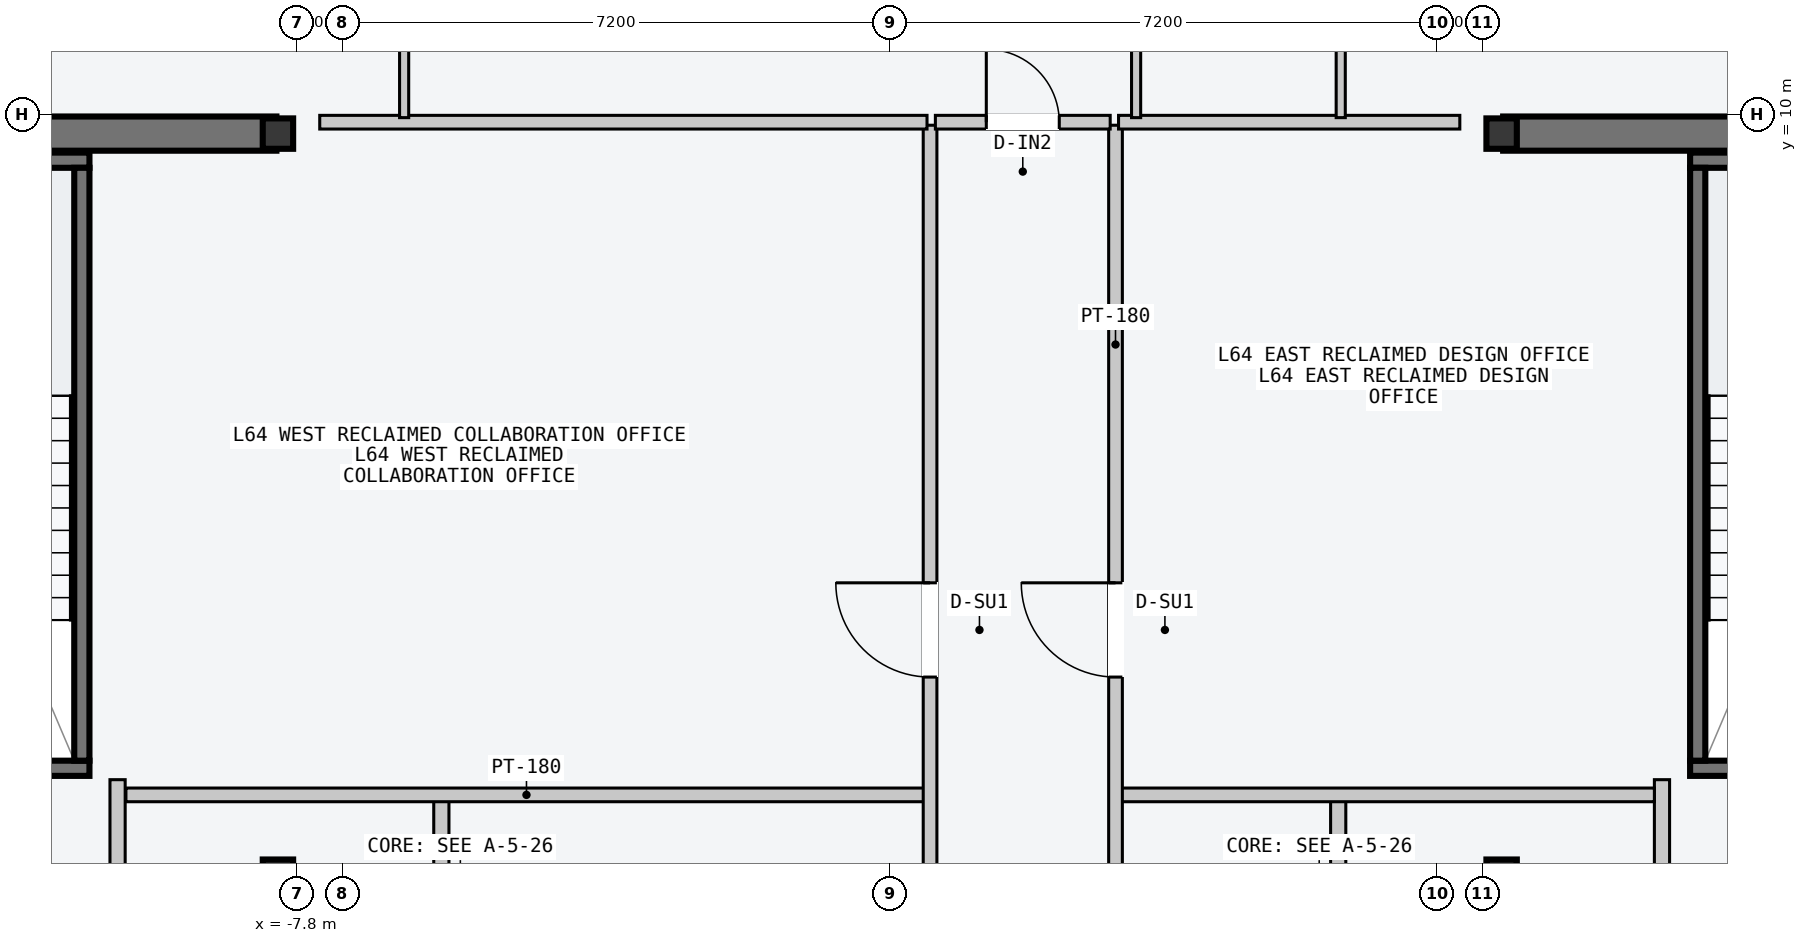
"""IFC4 building model, lengths in metres.
Left out: names, types, materials, properties, quantities, classifications, styles, units other than length and angle.
Written with IfcOpenShell. Run it as: python <this file> out.ifc"""

import sys

from ifc_helpers import new_model, si_unit, direction, frame, frame_2d, origin, origin_2d, place, context, subcontext, project, spatial, rectangle, i_section, extrude, element, fill, save


model = new_model("IFC4")
c1 = context("Model", 3, precision=1e-05, world=origin(), true_north=direction((0.0, 1.0)))
c2 = subcontext(c1, "Body", "Model", "MODEL_VIEW")
j1 = project(units=[si_unit("LENGTHUNIT", "METRE"), si_unit("PLANEANGLEUNIT", "RADIAN")], contexts=[c1])
p1 = place(None, origin())
s1 = spatial("IfcSite", under=j1, at=p1, CompositionType="ELEMENT")
p2 = place(p1, origin())
s2 = spatial("IfcBuilding", under=s1, at=p2, CompositionType="ELEMENT")
p3 = place(p2, frame((0.0, 0.0, 243.6)))
s3 = spatial("IfcBuildingStorey", under=s2, at=p3, CompositionType="ELEMENT", Elevation=243.6)
for number, where, z_axis, x_axis in (
    (1, (-14.53, 9.75, -0.2), (0.0, 0.0, 1.0), (1.0, 0.0, 0.0)),
    (2, (8.07, 9.75, -0.2), (0.0, 0.0, 1.0), (1.0, 0.0, 0.0)),
):
    element("IfcWall", number, at=place(p3, frame(where, z_axis=z_axis, x_axis=x_axis)), inside=s3, PredefinedType="SHEAR", context=c2, shape_type="SweptSolid", body=[
        extrude(rectangle(XDim=6.46, YDim=0.45, at=frame_2d((3.23, 0.0))), origin(), (0.0, 0.0, 1.0), 3.6),
    ])
p4 = place(p3, frame((-14.25, 1.4, -0.2), z_axis=(0.0, 0.0, 1.0), x_axis=(1.0, 0.0, 0.0)))
e3 = element("IfcWall", 3, at=p4, inside=s3, PredefinedType="SOLIDWALL", context=c2, shape_type="SweptSolid", body=[
    extrude(rectangle(XDim=3.72, YDim=0.2, at=frame_2d((1.86, 0.0))), origin(), (0.0, 0.0, 1.0), 3.6),
])
p5 = place(p4, frame((1.5, 0.0, 0.2)))
e4 = element("IfcOpeningElement", 4, at=p5, cuts=e3, PredefinedType="OPENING", context=c2, shape_type="SweptSolid", body=[
    extrude(rectangle(XDim=1.12, YDim=2.18, at=frame_2d((0.56, 1.09))), frame((0.0, 0.11, 0.0), z_axis=(0.0, -1.0, 0.0), x_axis=(1.0, 0.0, 0.0)), (0.0, 0.0, 1.0), 0.22),
])
p6 = place(p3, frame((-14.25, 9.4, -0.2), z_axis=(0.0, 0.0, 1.0), x_axis=(1.0, 0.0, 0.0)))
e5 = element("IfcWall", 5, at=p6, inside=s3, PredefinedType="SOLIDWALL", context=c2, shape_type="SweptSolid", body=[
    extrude(rectangle(XDim=3.72, YDim=0.2, at=frame_2d((1.86, 0.0))), origin(), (0.0, 0.0, 1.0), 3.6),
])
p7 = place(p3, frame((-10.63, 1.5, -0.2), z_axis=(0.0, 0.0, 1.0), x_axis=(0.0, 1.0, 0.0)))
e6 = element("IfcWall", 6, at=p7, inside=s3, PredefinedType="SOLIDWALL", context=c2, shape_type="SweptSolid", body=[
    extrude(rectangle(XDim=7.8, YDim=0.2, at=frame_2d((3.9, 0.0))), origin(), (0.0, 0.0, 1.0), 3.6),
])
p8 = place(p3, frame((10.53, 1.4, -0.2), z_axis=(0.0, 0.0, 1.0), x_axis=(1.0, 0.0, 0.0)))
e7 = element("IfcWall", 7, at=p8, inside=s3, PredefinedType="SOLIDWALL", context=c2, shape_type="SweptSolid", body=[
    extrude(rectangle(XDim=3.72, YDim=0.2, at=frame_2d((1.86, 0.0))), origin(), (0.0, 0.0, 1.0), 3.6),
])
p9 = place(p8, frame((1.5, 0.0, 0.2)))
e8 = element("IfcOpeningElement", 8, at=p9, cuts=e7, PredefinedType="OPENING", context=c2, shape_type="SweptSolid", body=[
    extrude(rectangle(XDim=1.12, YDim=2.18, at=frame_2d((0.56, 1.09))), frame((0.0, 0.11, 0.0), z_axis=(0.0, -1.0, 0.0), x_axis=(1.0, 0.0, 0.0)), (0.0, 0.0, 1.0), 0.22),
])
p10 = place(p3, frame((10.53, 9.4, -0.2), z_axis=(0.0, 0.0, 1.0), x_axis=(1.0, 0.0, 0.0)))
e9 = element("IfcWall", 9, at=p10, inside=s3, PredefinedType="SOLIDWALL", context=c2, shape_type="SweptSolid", body=[
    extrude(rectangle(XDim=3.72, YDim=0.2, at=frame_2d((1.86, 0.0))), origin(), (0.0, 0.0, 1.0), 3.6),
])
p11 = place(p3, frame((10.63, 1.5, -0.2), z_axis=(0.0, 0.0, 1.0), x_axis=(0.0, 1.0, 0.0)))
e10 = element("IfcWall", 10, at=p11, inside=s3, PredefinedType="SOLIDWALL", context=c2, shape_type="SweptSolid", body=[
    extrude(rectangle(XDim=7.8, YDim=0.2, at=frame_2d((3.9, 0.0))), origin(), (0.0, 0.0, 1.0), 3.6),
])
for number, where, z_axis, x_axis in (
    (11, (-8.05, 0.0, 0.0), (0.0, 0.0, 1.0), (1.0, 0.0, 0.0)),
    (12, (-8.05, 9.75, 0.0), (0.0, 0.0, 1.0), (1.0, 0.0, 0.0)),
    (13, (8.05, 0.0, 0.0), (0.0, 0.0, 1.0), (1.0, 0.0, 0.0)),
    (14, (8.05, 9.75, 0.0), (0.0, 0.0, 1.0), (1.0, 0.0, 0.0)),
):
    element("IfcColumn", number, at=place(p3, frame(where, z_axis=z_axis, x_axis=x_axis)), inside=s3, PredefinedType="COLUMN", context=c2, shape_type="SweptSolid", body=[
        extrude(i_section(OverallWidth=0.4, OverallDepth=0.4, WebThickness=0.013, FlangeThickness=0.021, at=origin_2d()), origin(), (0.0, 0.0, 1.0), 3.6),
    ])
p12 = place(p3, frame((-5.9, -9.45, 0.0), z_axis=(0.0, 0.0, 1.0), x_axis=(0.0, 1.0, 0.0)))
e15 = element("IfcWall", 15, at=p12, inside=s3, PredefinedType="PARTITIONING", context=c2, shape_type="SweptSolid", body=[
    extrude(rectangle(XDim=10.5, YDim=0.2, at=frame_2d((5.25, 0.0))), origin(), (0.0, 0.0, 1.0), 3.4),
])
p13 = place(p12, frame((3.9, 0.0, 0.0)))
e16 = element("IfcOpeningElement", 16, at=p13, cuts=e15, PredefinedType="OPENING", context=c2, shape_type="SweptSolid", body=[
    extrude(rectangle(XDim=1.5, YDim=2.2, at=frame_2d((0.75, 1.1))), frame((0.0, 0.11, 0.0), z_axis=(0.0, -1.0, 0.0), x_axis=(1.0, 0.0, 0.0)), (0.0, 0.0, 1.0), 0.22),
])
p14 = place(p3, frame((-10.16, -2.55, 0.0), z_axis=(0.0, 0.0, 1.0), x_axis=(0.0, 1.0, 0.0)))
e17 = element("IfcWall", 17, at=p14, inside=s3, PredefinedType="PARTITIONING", context=c2, shape_type="SweptSolid", body=[
    extrude(rectangle(XDim=3.8, YDim=0.2, at=frame_2d((1.9, 0.0))), origin(), (0.0, 0.0, 1.0), 3.4),
])
p15 = place(p14, frame((1.3, 0.0, 0.0)))
e18 = element("IfcOpeningElement", 18, at=p15, cuts=e17, PredefinedType="OPENING", context=c2, shape_type="SweptSolid", body=[
    extrude(rectangle(XDim=1.1, YDim=2.15, at=frame_2d((0.55, 1.075))), frame((0.0, 0.11, 0.0), z_axis=(0.0, -1.0, 0.0), x_axis=(1.0, 0.0, 0.0)), (0.0, 0.0, 1.0), 0.22),
])
p16 = place(p3, frame((5.9, -9.45, 0.0), z_axis=(0.0, 0.0, 1.0), x_axis=(0.0, 1.0, 0.0)))
e19 = element("IfcWall", 19, at=p16, inside=s3, PredefinedType="PARTITIONING", context=c2, shape_type="SweptSolid", body=[
    extrude(rectangle(XDim=10.5, YDim=0.2, at=frame_2d((5.25, 0.0))), origin(), (0.0, 0.0, 1.0), 3.4),
])
p17 = place(p16, frame((3.9, 0.0, 0.0)))
e20 = element("IfcOpeningElement", 20, at=p17, cuts=e19, PredefinedType="OPENING", context=c2, shape_type="SweptSolid", body=[
    extrude(rectangle(XDim=1.5, YDim=2.2, at=frame_2d((0.75, 1.1))), frame((0.0, 0.11, 0.0), z_axis=(0.0, -1.0, 0.0), x_axis=(1.0, 0.0, 0.0)), (0.0, 0.0, 1.0), 0.22),
])
p18 = place(p3, frame((10.16, -2.55, 0.0), z_axis=(0.0, 0.0, 1.0), x_axis=(0.0, 1.0, 0.0)))
e21 = element("IfcWall", 21, at=p18, inside=s3, PredefinedType="PARTITIONING", context=c2, shape_type="SweptSolid", body=[
    extrude(rectangle(XDim=3.8, YDim=0.2, at=frame_2d((1.9, 0.0))), origin(), (0.0, 0.0, 1.0), 3.4),
])
p19 = place(p18, frame((1.3, 0.0, 0.0)))
e22 = element("IfcOpeningElement", 22, at=p19, cuts=e21, PredefinedType="OPENING", context=c2, shape_type="SweptSolid", body=[
    extrude(rectangle(XDim=1.1, YDim=2.15, at=frame_2d((0.55, 1.075))), frame((0.0, 0.11, 0.0), z_axis=(0.0, -1.0, 0.0), x_axis=(1.0, 0.0, 0.0)), (0.0, 0.0, 1.0), 0.22),
])
p20 = place(p3, frame((-10.05, 1.05, 0.0), z_axis=(0.0, 0.0, 1.0), x_axis=(1.0, 0.0, 0.0)))
e23 = element("IfcWall", 23, at=p20, inside=s3, PredefinedType="PARTITIONING", context=c2, shape_type="SweptSolid", body=[
    extrude(rectangle(XDim=10.54, YDim=0.18, at=frame_2d((5.27, 0.0))), origin(), (0.0, 0.0, 1.0), 3.4),
])
p21 = place(p3, frame((0.53, -3.5, 0.0), z_axis=(0.0, 0.0, 1.0), x_axis=(0.0, 1.0, 0.0)))
e24 = element("IfcWall", 24, at=p21, inside=s3, PredefinedType="PARTITIONING", context=c2, shape_type="SweptSolid", body=[
    extrude(rectangle(XDim=13.36, YDim=0.18, at=frame_2d((6.68, 0.0))), origin(), (0.0, 0.0, 1.0), 3.4),
])
p22 = place(p21, frame((6.1, 0.0, 0.0)))
e25 = element("IfcOpeningElement", 25, at=p22, cuts=e24, PredefinedType="OPENING", context=c2, shape_type="SweptSolid", body=[
    extrude(rectangle(XDim=1.24, YDim=2.24, at=frame_2d((0.62, 1.12))), frame((0.0, 0.1, 0.0), z_axis=(0.0, -1.0, 0.0), x_axis=(1.0, 0.0, 0.0)), (0.0, 0.0, 1.0), 0.2),
])
p23 = place(p21, frame((1.6, 0.0, 0.0)))
e26 = element("IfcOpeningElement", 26, at=p23, cuts=e24, PredefinedType="OPENING", context=c2, shape_type="SweptSolid", body=[
    extrude(rectangle(XDim=0.96, YDim=2.18, at=frame_2d((0.48, 1.09))), frame((0.0, 0.1, 0.0), z_axis=(0.0, -1.0, 0.0), x_axis=(1.0, 0.0, 0.0)), (0.0, 0.0, 1.0), 0.2),
])
p24 = place(p3, frame((-7.5, 9.9, 0.0), z_axis=(0.0, 0.0, 1.0), x_axis=(1.0, 0.0, 0.0)))
e27 = element("IfcWall", 27, at=p24, inside=s3, PredefinedType="PARTITIONING", context=c2, shape_type="SweptSolid", body=[
    extrude(rectangle(XDim=7.99, YDim=0.18, at=frame_2d((3.995, 0.0))), origin(), (0.0, 0.0, 1.0), 3.4),
])
p25 = place(p3, frame((3.01, 1.05, 0.0), z_axis=(0.0, 0.0, 1.0), x_axis=(1.0, 0.0, 0.0)))
e28 = element("IfcWall", 28, at=p25, inside=s3, PredefinedType="PARTITIONING", context=c2, shape_type="SweptSolid", body=[
    extrude(rectangle(XDim=7.05, YDim=0.18, at=frame_2d((3.525, 0.0))), origin(), (0.0, 0.0, 1.0), 3.4),
])
p26 = place(p3, frame((2.97, -3.5, 0.0), z_axis=(0.0, 0.0, 1.0), x_axis=(0.0, 1.0, 0.0)))
e29 = element("IfcWall", 29, at=p26, inside=s3, PredefinedType="PARTITIONING", context=c2, shape_type="SweptSolid", body=[
    extrude(rectangle(XDim=13.36, YDim=0.18, at=frame_2d((6.68, 0.0))), origin(), (0.0, 0.0, 1.0), 3.4),
])
p27 = place(p26, frame((6.1, 0.0, 0.0)))
e30 = element("IfcOpeningElement", 30, at=p27, cuts=e29, PredefinedType="OPENING", context=c2, shape_type="SweptSolid", body=[
    extrude(rectangle(XDim=1.24, YDim=2.24, at=frame_2d((0.62, 1.12))), frame((0.0, 0.1, 0.0), z_axis=(0.0, -1.0, 0.0), x_axis=(1.0, 0.0, 0.0)), (0.0, 0.0, 1.0), 0.2),
])
p28 = place(p26, frame((1.6, 0.0, 0.0)))
e31 = element("IfcOpeningElement", 31, at=p28, cuts=e29, PredefinedType="OPENING", context=c2, shape_type="SweptSolid", body=[
    extrude(rectangle(XDim=0.96, YDim=2.18, at=frame_2d((0.48, 1.09))), frame((0.0, 0.1, 0.0), z_axis=(0.0, -1.0, 0.0), x_axis=(1.0, 0.0, 0.0)), (0.0, 0.0, 1.0), 0.2),
])
p29 = place(p3, frame((3.01, 9.9, 0.0), z_axis=(0.0, 0.0, 1.0), x_axis=(1.0, 0.0, 0.0)))
e32 = element("IfcWall", 32, at=p29, inside=s3, PredefinedType="PARTITIONING", context=c2, shape_type="SweptSolid", body=[
    extrude(rectangle(XDim=4.49, YDim=0.18, at=frame_2d((2.245, 0.0))), origin(), (0.0, 0.0, 1.0), 3.4),
])
p30 = place(p3, frame((-6.39, 9.96, 0.0), z_axis=(0.0, 0.0, 1.0), x_axis=(0.0, 1.0, 0.0)))
e33 = element("IfcWall", 33, at=p30, inside=s3, PredefinedType="PARTITIONING", context=c2, shape_type="SweptSolid", body=[
    extrude(rectangle(XDim=7.6, YDim=0.12, at=frame_2d((3.8, 0.0))), origin(), (0.0, 0.0, 1.0), 3.4),
])
p31 = place(p30, frame((1.15, 0.0, 0.0)))
e34 = element("IfcOpeningElement", 34, at=p31, cuts=e33, PredefinedType="OPENING", context=c2, shape_type="SweptSolid", body=[
    extrude(rectangle(XDim=0.96, YDim=2.18, at=frame_2d((0.48, 1.09))), frame((0.0, 0.07, 0.0), z_axis=(0.0, -1.0, 0.0), x_axis=(1.0, 0.0, 0.0)), (0.0, 0.0, 1.0), 0.14),
])
p32 = place(p3, frame((3.241, 9.96, 0.0), z_axis=(0.0, 0.0, 1.0), x_axis=(0.0, 1.0, 0.0)))
e35 = element("IfcWall", 35, at=p32, inside=s3, PredefinedType="PARTITIONING", context=c2, shape_type="SweptSolid", body=[
    extrude(rectangle(XDim=7.6, YDim=0.12, at=frame_2d((3.8, 0.0))), origin(), (0.0, 0.0, 1.0), 3.4),
])
p33 = place(p32, frame((1.15, 0.0, 0.0)))
e36 = element("IfcOpeningElement", 36, at=p33, cuts=e35, PredefinedType="OPENING", context=c2, shape_type="SweptSolid", body=[
    extrude(rectangle(XDim=0.96, YDim=2.18, at=frame_2d((0.48, 1.09))), frame((0.0, 0.07, 0.0), z_axis=(0.0, -1.0, 0.0), x_axis=(1.0, 0.0, 0.0)), (0.0, 0.0, 1.0), 0.14),
])
p34 = place(p3, frame((5.933, 9.96, 0.0), z_axis=(0.0, 0.0, 1.0), x_axis=(0.0, 1.0, 0.0)))
e37 = element("IfcWall", 37, at=p34, inside=s3, PredefinedType="PARTITIONING", context=c2, shape_type="SweptSolid", body=[
    extrude(rectangle(XDim=7.6, YDim=0.12, at=frame_2d((3.8, 0.0))), origin(), (0.0, 0.0, 1.0), 3.4),
])
p35 = place(p34, frame((1.15, 0.0, 0.0)))
e38 = element("IfcOpeningElement", 38, at=p35, cuts=e37, PredefinedType="OPENING", context=c2, shape_type="SweptSolid", body=[
    extrude(rectangle(XDim=0.96, YDim=2.18, at=frame_2d((0.48, 1.09))), frame((0.0, 0.07, 0.0), z_axis=(0.0, -1.0, 0.0), x_axis=(1.0, 0.0, 0.0)), (0.0, 0.0, 1.0), 0.14),
])
p36 = place(p3, frame((0.6, 9.9, 0.0), z_axis=(0.0, 0.0, 1.0), x_axis=(1.0, 0.0, 0.0)))
e39 = element("IfcWall", 39, at=p36, inside=s3, PredefinedType="PARTITIONING", context=c2, shape_type="SweptSolid", body=[
    extrude(rectangle(XDim=2.3, YDim=0.18, at=frame_2d((1.15, 0.0))), origin(), (0.0, 0.0, 1.0), 3.4),
])
p37 = place(p36, frame((0.67, 0.0, 0.0)))
e40 = element("IfcOpeningElement", 40, at=p37, cuts=e39, PredefinedType="OPENING", context=c2, shape_type="SweptSolid", body=[
    extrude(rectangle(XDim=0.96, YDim=2.18, at=frame_2d((0.48, 1.09))), frame((0.0, 0.1, 0.0), z_axis=(0.0, -1.0, 0.0), x_axis=(1.0, 0.0, 0.0)), (0.0, 0.0, 1.0), 0.2),
])
p38 = place(p22, origin())
e41 = element("IfcDoor", 41, at=p38, inside=s3, OperationType="SINGLE_SWING_RIGHT", PredefinedType="DOOR", context=c2, shape_type="SweptSolid", body=[
    extrude(rectangle(XDim=1.24, YDim=2.24, at=frame_2d((0.62, 1.12))), frame((0.0, 0.025, 0.0), z_axis=(0.0, -1.0, 0.0), x_axis=(1.0, 0.0, 0.0)), (0.0, 0.0, 1.0), 0.05),
])
fill(e25, e41)
p39 = place(p27, origin())
e42 = element("IfcDoor", 42, at=p39, inside=s3, OperationType="SINGLE_SWING_RIGHT", PredefinedType="DOOR", context=c2, shape_type="SweptSolid", body=[
    extrude(rectangle(XDim=1.24, YDim=2.24, at=frame_2d((0.62, 1.12))), frame((0.0, 0.025, 0.0), z_axis=(0.0, -1.0, 0.0), x_axis=(1.0, 0.0, 0.0)), (0.0, 0.0, 1.0), 0.05),
])
fill(e30, e42)
p40 = place(p37, origin())
e43 = element("IfcDoor", 43, at=p40, inside=s3, OperationType="SINGLE_SWING_LEFT", PredefinedType="DOOR", context=c2, shape_type="SweptSolid", body=[
    extrude(rectangle(XDim=0.96, YDim=2.18, at=frame_2d((0.48, 1.09))), frame((0.0, 0.025, 0.0), z_axis=(0.0, -1.0, 0.0), x_axis=(1.0, 0.0, 0.0)), (0.0, 0.0, 1.0), 0.05),
])
fill(e40, e43)
save(model, sys.argv[1])
